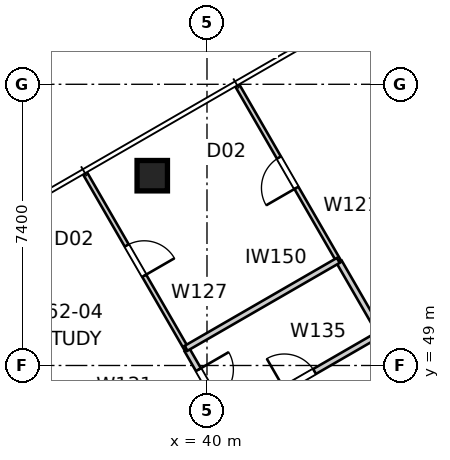
"""IFC4 building model, lengths in metres.
Left out: names, types, materials, properties, quantities, classifications, styles, units other than length and angle.
Written with IfcOpenShell. Run it as: python <this file> out.ifc"""

import sys

from ifc_helpers import new_model, si_unit, direction, frame, frame_2d, origin, origin_2d, place, context, subcontext, project, spatial, rectangle, extrude, element, fill, save


model = new_model("IFC4")
c1 = context("Model", 3, precision=1e-05, world=origin(), true_north=direction((0.0, 1.0)))
c2 = subcontext(c1, "Body", "Model", "MODEL_VIEW")
j1 = project(units=[si_unit("LENGTHUNIT", "METRE"), si_unit("PLANEANGLEUNIT", "RADIAN")], contexts=[c1])
p1 = place(None, origin())
s1 = spatial("IfcSite", under=j1, at=p1, CompositionType="ELEMENT")
p2 = place(p1, origin())
s2 = spatial("IfcBuilding", under=s1, at=p2, CompositionType="ELEMENT")
p3 = place(p2, frame((0.0, 0.0, 225.2)))
s3 = spatial("IfcBuildingStorey", under=s2, at=p3, CompositionType="ELEMENT", Elevation=225.2)
p4 = place(p3, frame((38.56, 53.995, 0.0), z_axis=(0.0, 0.0, 1.0), x_axis=(1.0, 0.0, 0.0)))
e1 = element("IfcColumn", 1, at=p4, inside=s3, PredefinedType="COLUMN", context=c2, shape_type="SweptSolid", body=[
    extrude(rectangle(XDim=0.8, YDim=0.8, at=origin_2d()), origin(), (0.0, 0.0, 1.0), 3.4),
])
p5 = place(p3, frame((43.48, 51.722, 0.0), z_axis=(0.0, 0.0, 1.0), x_axis=(-0.499989180974, 0.866031650062, 0.0)))
e2 = element("IfcWall", 2, at=p5, inside=s3, PredefinedType="PARTITIONING", context=c2, shape_type="SweptSolid", body=[
    extrude(rectangle(XDim=5.388, YDim=0.12, at=frame_2d((2.694, 0.0))), origin(), (0.0, 0.0, 1.0), 3.25),
])
p6 = place(p5, frame((2.254, 0.0, 0.0)))
e3 = element("IfcOpeningElement", 3, at=p6, cuts=e2, PredefinedType="OPENING", context=c2, shape_type="SweptSolid", body=[
    extrude(rectangle(XDim=0.92, YDim=2.34, at=frame_2d((0.46, 1.17))), frame((0.0, 0.07, 0.0), z_axis=(0.0, -1.0, 0.0), x_axis=(1.0, 0.0, 0.0)), (0.0, 0.0, 1.0), 0.14),
])
p7 = place(p3, frame((44.54, 49.887, 0.0), z_axis=(0.0, 0.0, 1.0), x_axis=(-0.500005013853, 0.866022509016, 0.0)))
e4 = element("IfcWall", 4, at=p7, inside=s3, PredefinedType="SOLIDWALL", context=c2, shape_type="SweptSolid", body=[
    extrude(rectangle(XDim=2.119, YDim=0.15, at=frame_2d((1.06, 0.0))), origin(), (0.0, 0.0, 1.0), 3.25),
])
p8 = place(p3, frame((36.781, 54.076, 0.0), z_axis=(0.0, 0.0, 1.0), x_axis=(0.499989180974, -0.866031650062, 0.0)))
e5 = element("IfcWall", 5, at=p8, inside=s3, PredefinedType="PARTITIONING", context=c2, shape_type="SweptSolid", body=[
    extrude(rectangle(XDim=5.388, YDim=0.12, at=frame_2d((2.694, 0.0))), origin(), (0.0, 0.0, 1.0), 3.25),
])
p9 = place(p8, frame((2.214, 0.0, 0.0)))
e6 = element("IfcOpeningElement", 6, at=p9, cuts=e5, PredefinedType="OPENING", context=c2, shape_type="SweptSolid", body=[
    extrude(rectangle(XDim=0.92, YDim=2.34, at=frame_2d((0.46, 1.17))), frame((0.0, 0.07, 0.0), z_axis=(0.0, -1.0, 0.0), x_axis=(1.0, 0.0, 0.0)), (0.0, 0.0, 1.0), 0.14),
])
p10 = place(p3, frame((36.103, 46.0, 0.0), z_axis=(0.0, 0.0, 1.0), x_axis=(-0.500013541994, 0.866017585169, 0.0)))
e7 = element("IfcWall", 7, at=p10, inside=s3, PredefinedType="PARTITIONING", context=c2, shape_type="SweptSolid", body=[
    extrude(rectangle(XDim=6.655, YDim=0.12, at=frame_2d((3.328, 0.0))), origin(), (0.0, 0.0, 1.0), 3.25),
])
p11 = place(p10, frame((2.887, 0.0, 0.0)))
e8 = element("IfcOpeningElement", 8, at=p11, cuts=e7, PredefinedType="OPENING", context=c2, shape_type="SweptSolid", body=[
    extrude(rectangle(XDim=0.92, YDim=2.34, at=frame_2d((0.46, 1.17))), frame((0.0, 0.07, 0.0), z_axis=(0.0, -1.0, 0.0), x_axis=(1.0, 0.0, 0.0)), (0.0, 0.0, 1.0), 0.14),
])
p12 = place(p3, frame((39.475, 49.41, 0.0), z_axis=(0.0, 0.0, 1.0), x_axis=(0.500008142102, -0.866020702889, 0.0)))
e9 = element("IfcWall", 9, at=p12, inside=s3, PredefinedType="SOLIDWALL", context=c2, shape_type="SweptSolid", body=[
    extrude(rectangle(XDim=2.219, YDim=0.15, at=frame_2d((1.11, 0.0))), origin(), (0.0, 0.0, 1.0), 3.25),
])
p13 = place(p12, frame((0.6, 0.0, 0.0)))
e10 = element("IfcOpeningElement", 10, at=p13, cuts=e9, PredefinedType="OPENING", context=c2, shape_type="SweptSolid", body=[
    extrude(rectangle(XDim=0.92, YDim=2.34, at=frame_2d((0.46, 1.17))), frame((0.0, 0.085, 0.0), z_axis=(0.0, -1.0, 0.0), x_axis=(1.0, 0.0, 0.0)), (0.0, 0.0, 1.0), 0.17),
])
p14 = place(p3, frame((43.455, 51.766, 0.0), z_axis=(0.0, 0.0, 1.0), x_axis=(-0.866025598446, -0.499999662836, 0.0)))
e11 = element("IfcWall", 11, at=p14, inside=s3, PredefinedType="SOLIDWALL", context=c2, shape_type="SweptSolid", body=[
    extrude(rectangle(XDim=4.625, YDim=0.15, at=frame_2d((2.312, 0.0))), origin(), (0.0, 0.0, 1.0), 3.25),
])
p15 = place(p3, frame((40.559, 47.531, 0.0), z_axis=(0.0, 0.0, 1.0), x_axis=(0.866025598446, 0.499999662836, 0.0)))
e12 = element("IfcWall", 12, at=p15, inside=s3, PredefinedType="SOLIDWALL", context=c2, shape_type="SweptSolid", body=[
    extrude(rectangle(XDim=4.625, YDim=0.15, at=frame_2d((2.312, 0.0))), origin(), (0.0, 0.0, 1.0), 3.25),
])
p16 = place(p15, frame((1.702, 0.0, 0.0)))
e13 = element("IfcOpeningElement", 13, at=p16, cuts=e12, PredefinedType="OPENING", context=c2, shape_type="SweptSolid", body=[
    extrude(rectangle(XDim=0.92, YDim=2.34, at=frame_2d((0.46, 1.17))), frame((0.0, 0.085, 0.0), z_axis=(0.0, -1.0, 0.0), x_axis=(1.0, 0.0, 0.0)), (0.0, 0.0, 1.0), 0.17),
])
p17 = place(p9, origin())
e14 = element("IfcDoor", 14, at=p17, inside=s3, OperationType="SINGLE_SWING_RIGHT", PredefinedType="DOOR", context=c2, shape_type="SweptSolid", body=[
    extrude(rectangle(XDim=0.92, YDim=2.34, at=frame_2d((0.46, 1.17))), frame((0.0, 0.025, 0.0), z_axis=(0.0, -1.0, 0.0), x_axis=(1.0, 0.0, 0.0)), (0.0, 0.0, 1.0), 0.05),
])
fill(e6, e14)
p18 = place(p13, origin())
e15 = element("IfcDoor", 15, at=p18, inside=s3, OperationType="SINGLE_SWING_LEFT", PredefinedType="DOOR", context=c2, shape_type="SweptSolid", body=[
    extrude(rectangle(XDim=0.92, YDim=2.34, at=frame_2d((0.46, 1.17))), frame((0.0, 0.025, 0.0), z_axis=(0.0, -1.0, 0.0), x_axis=(1.0, 0.0, 0.0)), (0.0, 0.0, 1.0), 0.05),
])
fill(e10, e15)
p19 = place(p6, origin())
e16 = element("IfcDoor", 16, at=p19, inside=s3, OperationType="SINGLE_SWING_LEFT", PredefinedType="DOOR", context=c2, shape_type="SweptSolid", body=[
    extrude(rectangle(XDim=0.92, YDim=2.34, at=frame_2d((0.46, 1.17))), frame((0.0, 0.025, 0.0), z_axis=(0.0, -1.0, 0.0), x_axis=(1.0, 0.0, 0.0)), (0.0, 0.0, 1.0), 0.05),
])
fill(e3, e16)
p20 = place(p16, origin())
e17 = element("IfcDoor", 17, at=p20, inside=s3, OperationType="SINGLE_SWING_LEFT", PredefinedType="DOOR", context=c2, shape_type="SweptSolid", body=[
    extrude(rectangle(XDim=0.92, YDim=2.34, at=frame_2d((0.46, 1.17))), frame((0.0, 0.025, 0.0), z_axis=(0.0, -1.0, 0.0), x_axis=(1.0, 0.0, 0.0)), (0.0, 0.0, 1.0), 0.05),
])
fill(e13, e17)
save(model, sys.argv[1])
